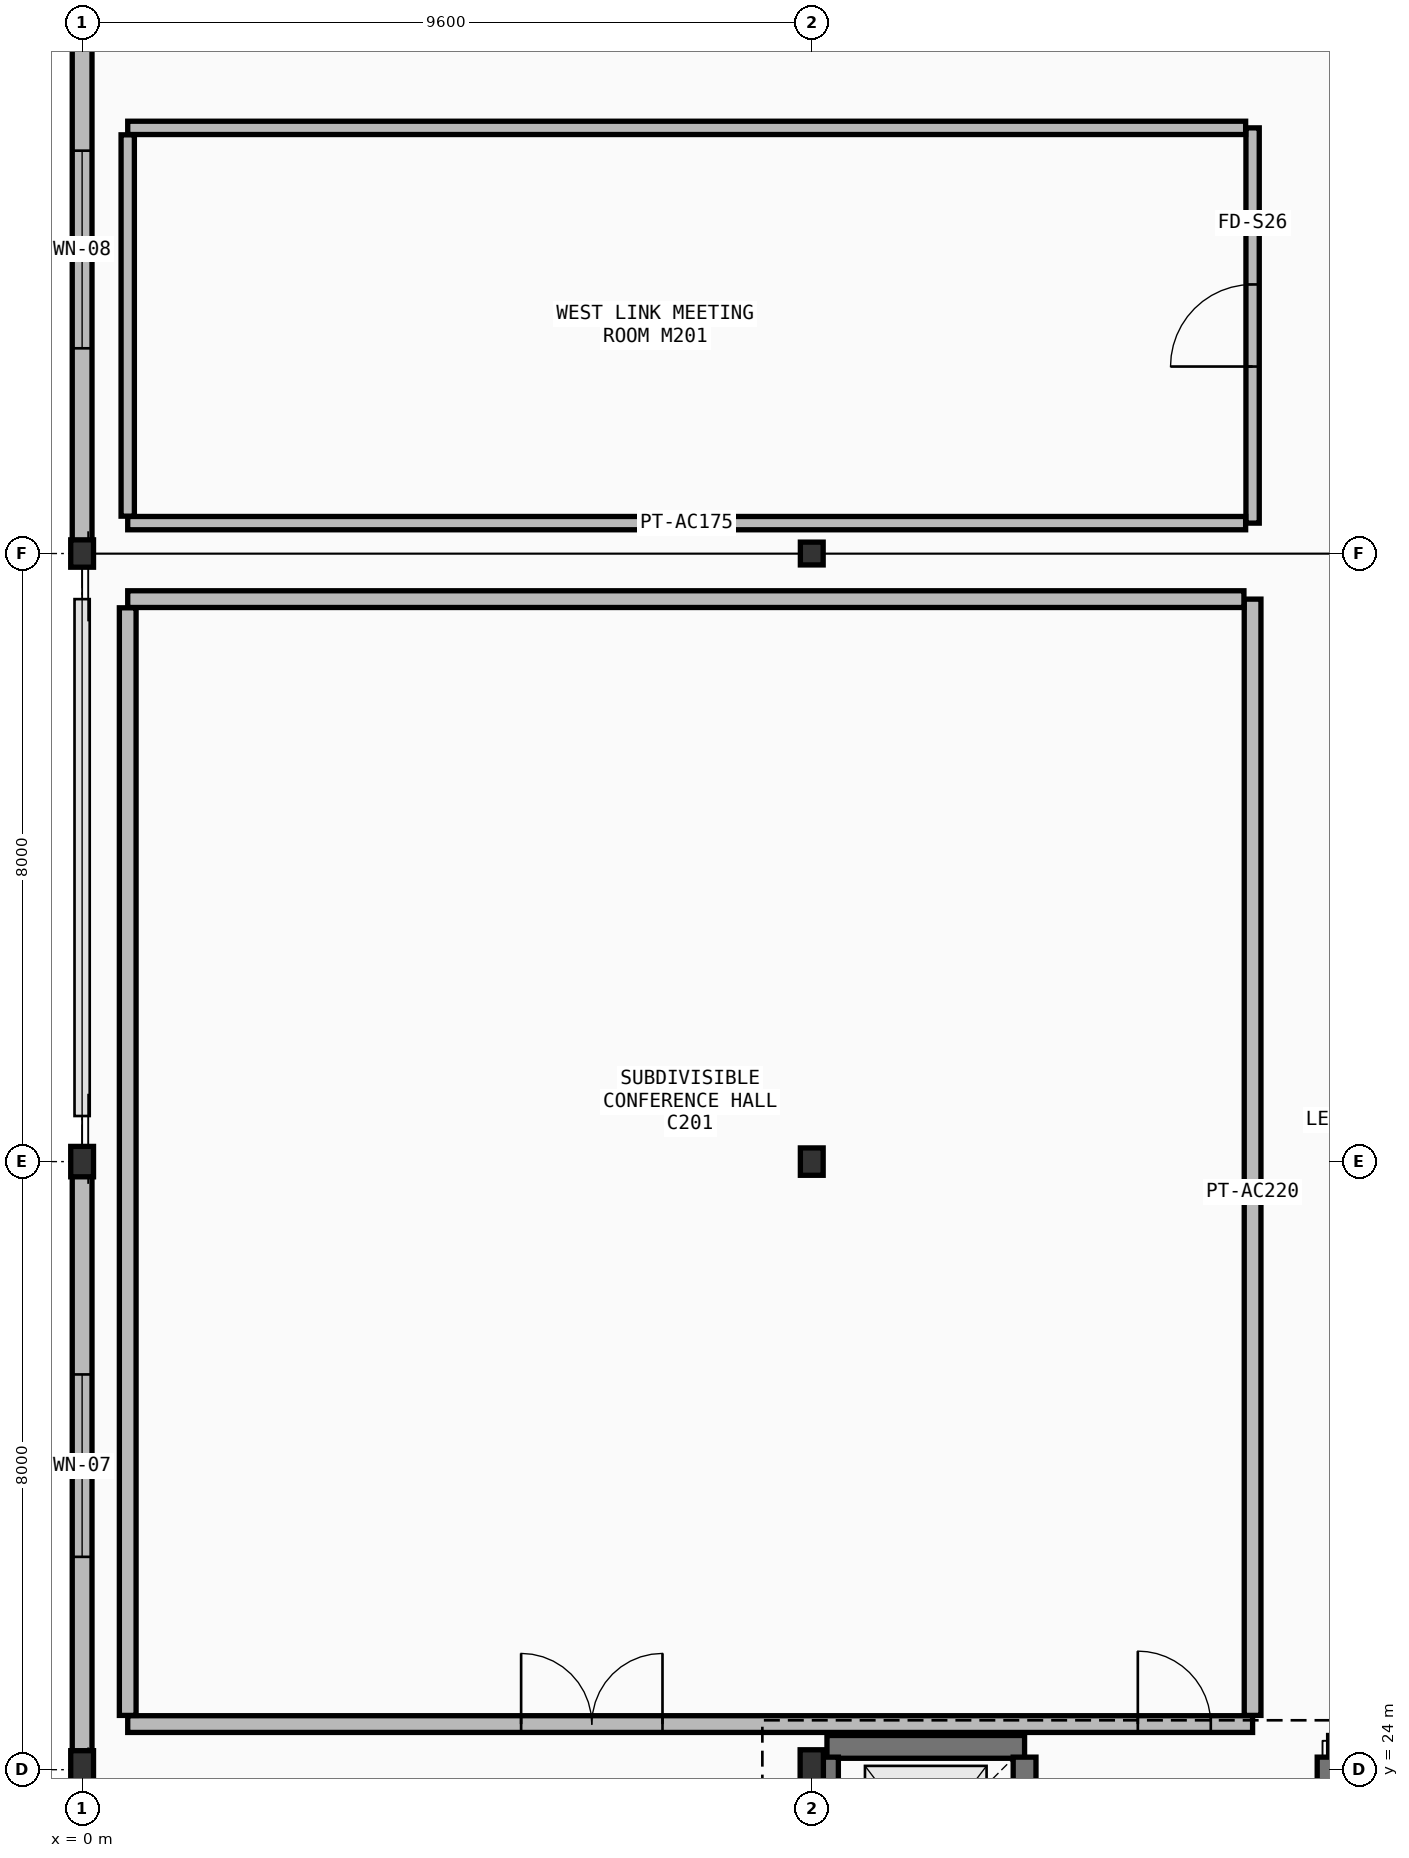
"""IFC4 building model, lengths in metres.
Left out: names, types, materials, properties, quantities, classifications, styles, units other than length and angle.
Written with IfcOpenShell. Run it as: python <this file> out.ifc"""

import sys

from ifc_helpers import new_model, si_unit, direction, frame, frame_2d, origin, origin_2d, place, context, subcontext, project, spatial, rectangle, i_section, extrude, element, fill, save


model = new_model("IFC4")
c1 = context("Model", 3, precision=1e-05, world=origin(), true_north=direction((0.0, 1.0)))
c2 = subcontext(c1, "Body", "Model", "MODEL_VIEW")
j1 = project(units=[si_unit("LENGTHUNIT", "METRE"), si_unit("PLANEANGLEUNIT", "RADIAN")], contexts=[c1])
p1 = place(None, origin())
s1 = spatial("IfcSite", under=j1, at=p1, CompositionType="ELEMENT")
p2 = place(p1, origin())
s2 = spatial("IfcBuilding", under=s1, at=p2, CompositionType="ELEMENT")
p3 = place(p2, frame((0.0, 0.0, 11.4)))
s3 = spatial("IfcBuildingStorey", under=s2, at=p3, CompositionType="ELEMENT", Elevation=11.4)
p4 = place(p3, frame((0.0, 24.0, 0.0), z_axis=(0.0, 0.0, 1.0), x_axis=(1.0, 0.0, 0.0)))
e1 = element("IfcColumn", 1, at=p4, inside=s3, PredefinedType="COLUMN", context=c2, shape_type="SweptSolid", body=[
    extrude(i_section(OverallWidth=0.3, OverallDepth=0.5, WebThickness=0.014, FlangeThickness=0.028, FilletRadius=0.027, at=origin_2d()), origin(), (0.0, 0.0, 1.0), 4.5),
])
p5 = place(p3, frame((0.0, 32.0, 0.0), z_axis=(0.0, 0.0, 1.0), x_axis=(1.0, 0.0, 0.0)))
e2 = element("IfcColumn", 2, at=p5, inside=s3, PredefinedType="COLUMN", context=c2, shape_type="SweptSolid", body=[
    extrude(i_section(OverallWidth=0.3, OverallDepth=0.4, WebThickness=0.013, FlangeThickness=0.024, FilletRadius=0.027, at=origin_2d()), origin(), (0.0, 0.0, 1.0), 4.5),
])
p6 = place(p3, frame((0.0, 40.0, 0.0), z_axis=(0.0, 0.0, 1.0), x_axis=(1.0, 0.0, 0.0)))
e3 = element("IfcColumn", 3, at=p6, inside=s3, PredefinedType="COLUMN", context=c2, shape_type="SweptSolid", body=[
    extrude(i_section(OverallWidth=0.3, OverallDepth=0.36, WebThickness=0.012, FlangeThickness=0.022, FilletRadius=0.027, at=origin_2d()), origin(), (0.0, 0.0, 1.0), 4.5),
])
p7 = place(p3, frame((9.6, 24.0, 0.0), z_axis=(0.0, 0.0, 1.0), x_axis=(1.0, 0.0, 0.0)))
e4 = element("IfcColumn", 4, at=p7, inside=s3, PredefinedType="COLUMN", context=c2, shape_type="SweptSolid", body=[
    extrude(i_section(OverallWidth=0.306, OverallDepth=0.524, WebThickness=0.021, FlangeThickness=0.04, FilletRadius=0.027, at=origin_2d()), origin(), (0.0, 0.0, 1.0), 4.5),
])
p8 = place(p3, frame((9.6, 32.0, 0.0), z_axis=(0.0, 0.0, 1.0), x_axis=(1.0, 0.0, 0.0)))
e5 = element("IfcColumn", 5, at=p8, inside=s3, PredefinedType="COLUMN", context=c2, shape_type="SweptSolid", body=[
    extrude(i_section(OverallWidth=0.3, OverallDepth=0.36, WebThickness=0.012, FlangeThickness=0.022, FilletRadius=0.027, at=origin_2d()), origin(), (0.0, 0.0, 1.0), 4.5),
])
p9 = place(p3, frame((9.6, 40.0, 0.0), z_axis=(0.0, 0.0, 1.0), x_axis=(1.0, 0.0, 0.0)))
e6 = element("IfcColumn", 6, at=p9, inside=s3, PredefinedType="COLUMN", context=c2, shape_type="SweptSolid", body=[
    extrude(i_section(OverallWidth=0.3, OverallDepth=0.3, WebThickness=0.011, FlangeThickness=0.019, FilletRadius=0.027, at=origin_2d()), origin(), (0.0, 0.0, 1.0), 4.5),
])
p10 = place(p3, frame((0.0, 24.0, 0.0), z_axis=(0.0, 0.0, 1.0), x_axis=(0.0, 1.0, 0.0)))
e7 = element("IfcWall", 7, at=p10, inside=s3, PredefinedType="STANDARD", context=c2, shape_type="SweptSolid", body=[
    extrude(rectangle(XDim=8.0, YDim=0.26, at=frame_2d((4.0, 0.0))), origin(), (0.0, 0.0, 1.0), 3.79),
])
p11 = place(p10, frame((2.8, 0.0, 0.9)))
e8 = element("IfcOpeningElement", 8, at=p11, cuts=e7, PredefinedType="OPENING", context=c2, shape_type="SweptSolid", body=[
    extrude(rectangle(XDim=2.4, YDim=2.2, at=frame_2d((1.2, 1.1))), frame((0.0, 0.14, 0.0), z_axis=(0.0, -1.0, 0.0), x_axis=(1.0, 0.0, 0.0)), (0.0, 0.0, 1.0), 0.28),
])
p12 = place(p3, frame((0.0, 40.0, 0.0), z_axis=(0.0, 0.0, 1.0), x_axis=(0.0, 1.0, 0.0)))
e9 = element("IfcWall", 9, at=p12, inside=s3, PredefinedType="STANDARD", context=c2, shape_type="SweptSolid", body=[
    extrude(rectangle(XDim=8.0, YDim=0.26, at=frame_2d((4.0, 0.0))), origin(), (0.0, 0.0, 1.0), 3.79),
])
p13 = place(p12, frame((2.7, 0.0, 0.9)))
e10 = element("IfcOpeningElement", 10, at=p13, cuts=e9, PredefinedType="OPENING", context=c2, shape_type="SweptSolid", body=[
    extrude(rectangle(XDim=2.6, YDim=2.2, at=frame_2d((1.3, 1.1))), frame((0.0, 0.14, 0.0), z_axis=(0.0, -1.0, 0.0), x_axis=(1.0, 0.0, 0.0)), (0.0, 0.0, 1.0), 0.28),
])
p14 = place(p3, frame((12.4, 24.3, 0.0), z_axis=(0.0, 0.0, 1.0), x_axis=(-1.0, 0.0, 0.0)))
e11 = element("IfcWall", 11, at=p14, inside=s3, PredefinedType="SHEAR", context=c2, shape_type="SweptSolid", body=[
    extrude(rectangle(XDim=2.6, YDim=0.3, at=frame_2d((1.3, 0.0))), origin(), (0.0, 0.0, 1.0), 4.27),
])
p15 = place(p3, frame((12.4, 21.665, 0.0), z_axis=(0.0, 0.0, 1.0), x_axis=(0.0, 1.0, 0.0)))
e12 = element("IfcWall", 12, at=p15, inside=s3, PredefinedType="SHEAR", context=c2, shape_type="SweptSolid", body=[
    extrude(rectangle(XDim=2.5, YDim=0.3, at=frame_2d((1.25, 0.0))), origin(), (0.0, 0.0, 1.0), 4.27),
])
p16 = place(p15, frame((0.55, 0.0, 0.0)))
e13 = element("IfcOpeningElement", 13, at=p16, cuts=e12, PredefinedType="OPENING", context=c2, shape_type="SweptSolid", body=[
    extrude(rectangle(XDim=1.4, YDim=2.26, at=frame_2d((0.7, 1.13))), frame((0.0, 0.16, 0.0), z_axis=(0.0, -1.0, 0.0), x_axis=(1.0, 0.0, 0.0)), (0.0, 0.0, 1.0), 0.32),
])
p17 = place(p3, frame((9.8, 24.165, 0.0), z_axis=(0.0, 0.0, 1.0), x_axis=(0.0, -1.0, 0.0)))
e14 = element("IfcWall", 14, at=p17, inside=s3, PredefinedType="SHEAR", context=c2, shape_type="SweptSolid", body=[
    extrude(rectangle(XDim=2.33, YDim=0.3, at=frame_2d((1.165, 0.0))), origin(), (0.0, 0.0, 1.0), 4.27),
])
p18 = place(p3, frame((16.4, 24.165, 0.0), z_axis=(0.0, 0.0, 1.0), x_axis=(0.0, -1.0, 0.0)))
e15 = element("IfcWall", 15, at=p18, inside=s3, PredefinedType="SHEAR", context=c2, shape_type="SweptSolid", body=[
    extrude(rectangle(XDim=2.5, YDim=0.3, at=frame_2d((1.25, 0.0))), origin(), (0.0, 0.0, 1.0), 4.27),
])
p19 = place(p18, frame((0.65, 0.0, 0.0)))
e16 = element("IfcOpeningElement", 16, at=p19, cuts=e15, PredefinedType="OPENING", context=c2, shape_type="SweptSolid", body=[
    extrude(rectangle(XDim=1.2, YDim=2.2, at=frame_2d((0.6, 1.1))), frame((0.0, 0.16, 0.0), z_axis=(0.0, -1.0, 0.0), x_axis=(1.0, 0.0, 0.0)), (0.0, 0.0, 1.0), 0.32),
])
p20 = place(p3, frame((0.6, 24.6, 0.0), z_axis=(0.0, 0.0, 1.0), x_axis=(1.0, 0.0, 0.0)))
e17 = element("IfcWall", 17, at=p20, inside=s3, PredefinedType="PARTITIONING", context=c2, shape_type="SweptSolid", body=[
    extrude(rectangle(XDim=14.8, YDim=0.22, at=frame_2d((7.4, 0.0))), origin(), (0.0, 0.0, 1.0), 3.64),
])
p21 = place(p20, frame((5.176, 0.0, 0.0)))
e18 = element("IfcOpeningElement", 18, at=p21, cuts=e17, PredefinedType="OPENING", context=c2, shape_type="SweptSolid", body=[
    extrude(rectangle(XDim=1.86, YDim=2.32, at=frame_2d((0.93, 1.16))), frame((0.0, 0.12, 0.0), z_axis=(0.0, -1.0, 0.0), x_axis=(1.0, 0.0, 0.0)), (0.0, 0.0, 1.0), 0.24),
])
p22 = place(p20, frame((13.29, 0.0, 0.0)))
e19 = element("IfcOpeningElement", 19, at=p22, cuts=e17, PredefinedType="OPENING", context=c2, shape_type="SweptSolid", body=[
    extrude(rectangle(XDim=0.96, YDim=2.45, at=frame_2d((0.48, 1.225))), frame((0.0, 0.12, 0.0), z_axis=(0.0, -1.0, 0.0), x_axis=(1.0, 0.0, 0.0)), (0.0, 0.0, 1.0), 0.24),
])
p23 = place(p3, frame((15.4, 24.714, 0.0), z_axis=(0.0, 0.0, 1.0), x_axis=(0.0, 1.0, 0.0)))
e20 = element("IfcWall", 20, at=p23, inside=s3, PredefinedType="PARTITIONING", context=c2, shape_type="SweptSolid", body=[
    extrude(rectangle(XDim=14.686, YDim=0.22, at=frame_2d((7.343, 0.0))), origin(), (0.0, 0.0, 1.0), 3.64),
])
p24 = place(p3, frame((15.286, 39.4, 0.0), z_axis=(0.0, 0.0, 1.0), x_axis=(-1.0, 0.0, 0.0)))
e21 = element("IfcWall", 21, at=p24, inside=s3, PredefinedType="PARTITIONING", context=c2, shape_type="SweptSolid", body=[
    extrude(rectangle(XDim=14.686, YDim=0.22, at=frame_2d((7.343, 0.0))), origin(), (0.0, 0.0, 1.0), 3.74),
])
p25 = place(p3, frame((0.6, 39.286, 0.0), z_axis=(0.0, 0.0, 1.0), x_axis=(0.0, -1.0, 0.0)))
e22 = element("IfcWall", 22, at=p25, inside=s3, PredefinedType="PARTITIONING", context=c2, shape_type="SweptSolid", body=[
    extrude(rectangle(XDim=14.572, YDim=0.22, at=frame_2d((7.286, 0.0))), origin(), (0.0, 0.0, 1.0), 3.85),
])
p26 = place(p3, frame((15.4, 40.4, 0.0), z_axis=(0.0, 0.0, 1.0), x_axis=(0.0, 1.0, 0.0)))
e23 = element("IfcWall", 23, at=p26, inside=s3, PredefinedType="PARTITIONING", context=c2, shape_type="SweptSolid", body=[
    extrude(rectangle(XDim=5.2, YDim=0.175, at=frame_2d((2.6, 0.0))), origin(), (0.0, 0.0, 1.0), 4.27),
])
p27 = place(p26, frame((2.06, 0.0, 0.0)))
e24 = element("IfcOpeningElement", 24, at=p27, cuts=e23, PredefinedType="OPENING", context=c2, shape_type="SweptSolid", body=[
    extrude(rectangle(XDim=1.08, YDim=2.38, at=frame_2d((0.54, 1.19))), frame((0.0, 0.097, 0.0), z_axis=(0.0, -1.0, 0.0), x_axis=(1.0, 0.0, 0.0)), (0.0, 0.0, 1.0), 0.195),
])
for number, where, z_axis, x_axis in (
    (25, (0.6, 40.4, 0.0), (0.0, 0.0, 1.0), (1.0, 0.0, 0.0)),
    (26, (15.309, 45.6, 0.0), (0.0, 0.0, 1.0), (-1.0, 0.0, 0.0)),
):
    element("IfcWall", number, at=place(p3, frame(where, z_axis=z_axis, x_axis=x_axis)), inside=s3, PredefinedType="PARTITIONING", context=c2, shape_type="SweptSolid", body=[
        extrude(rectangle(XDim=14.708, YDim=0.175, at=frame_2d((7.354, 0.0))), origin(), (0.0, 0.0, 1.0), 3.64),
    ])
p28 = place(p3, frame((0.6, 45.509, 0.0), z_axis=(0.0, 0.0, 1.0), x_axis=(0.0, -1.0, 0.0)))
e27 = element("IfcWall", 27, at=p28, inside=s3, PredefinedType="PARTITIONING", context=c2, shape_type="SweptSolid", body=[
    extrude(rectangle(XDim=5.017, YDim=0.175, at=frame_2d((2.509, 0.0))), origin(), (0.0, 0.0, 1.0), 4.27),
])
p29 = place(p11, origin())
e28 = element("IfcWindow", 28, at=p29, inside=s3, PartitioningType="SINGLE_PANEL", PredefinedType="WINDOW", context=c2, shape_type="SweptSolid", body=[
    extrude(rectangle(XDim=2.4, YDim=2.2, at=frame_2d((1.2, 1.1))), frame((0.0, 0.03, 0.0), z_axis=(0.0, -1.0, 0.0), x_axis=(1.0, 0.0, 0.0)), (0.0, 0.0, 1.0), 0.06),
])
fill(e8, e28)
p30 = place(p13, origin())
e29 = element("IfcWindow", 29, at=p30, inside=s3, PartitioningType="SINGLE_PANEL", PredefinedType="WINDOW", context=c2, shape_type="SweptSolid", body=[
    extrude(rectangle(XDim=2.6, YDim=2.2, at=frame_2d((1.3, 1.1))), frame((0.0, 0.03, 0.0), z_axis=(0.0, -1.0, 0.0), x_axis=(1.0, 0.0, 0.0)), (0.0, 0.0, 1.0), 0.06),
])
fill(e10, e29)
p31 = place(p21, origin())
e30 = element("IfcDoor", 30, at=p31, inside=s3, OperationType="DOUBLE_DOOR_SINGLE_SWING", PredefinedType="DOOR", context=c2, shape_type="SweptSolid", body=[
    extrude(rectangle(XDim=1.86, YDim=2.32, at=frame_2d((0.93, 1.16))), frame((0.0, 0.025, 0.0), z_axis=(0.0, -1.0, 0.0), x_axis=(1.0, 0.0, 0.0)), (0.0, 0.0, 1.0), 0.05),
])
fill(e18, e30)
p32 = place(p22, origin())
e31 = element("IfcDoor", 31, at=p32, inside=s3, OperationType="SINGLE_SWING_RIGHT", PredefinedType="DOOR", context=c2, shape_type="SweptSolid", body=[
    extrude(rectangle(XDim=0.96, YDim=2.45, at=frame_2d((0.48, 1.225))), frame((0.0, 0.025, 0.0), z_axis=(0.0, -1.0, 0.0), x_axis=(1.0, 0.0, 0.0)), (0.0, 0.0, 1.0), 0.05),
])
fill(e19, e31)
p33 = place(p27, origin())
e32 = element("IfcDoor", 32, at=p33, inside=s3, OperationType="SINGLE_SWING_LEFT", PredefinedType="DOOR", context=c2, shape_type="SweptSolid", body=[
    extrude(rectangle(XDim=1.08, YDim=2.38, at=frame_2d((0.54, 1.19))), frame((0.0, 0.025, 0.0), z_axis=(0.0, -1.0, 0.0), x_axis=(1.0, 0.0, 0.0)), (0.0, 0.0, 1.0), 0.05),
])
fill(e24, e32)
save(model, sys.argv[1])
